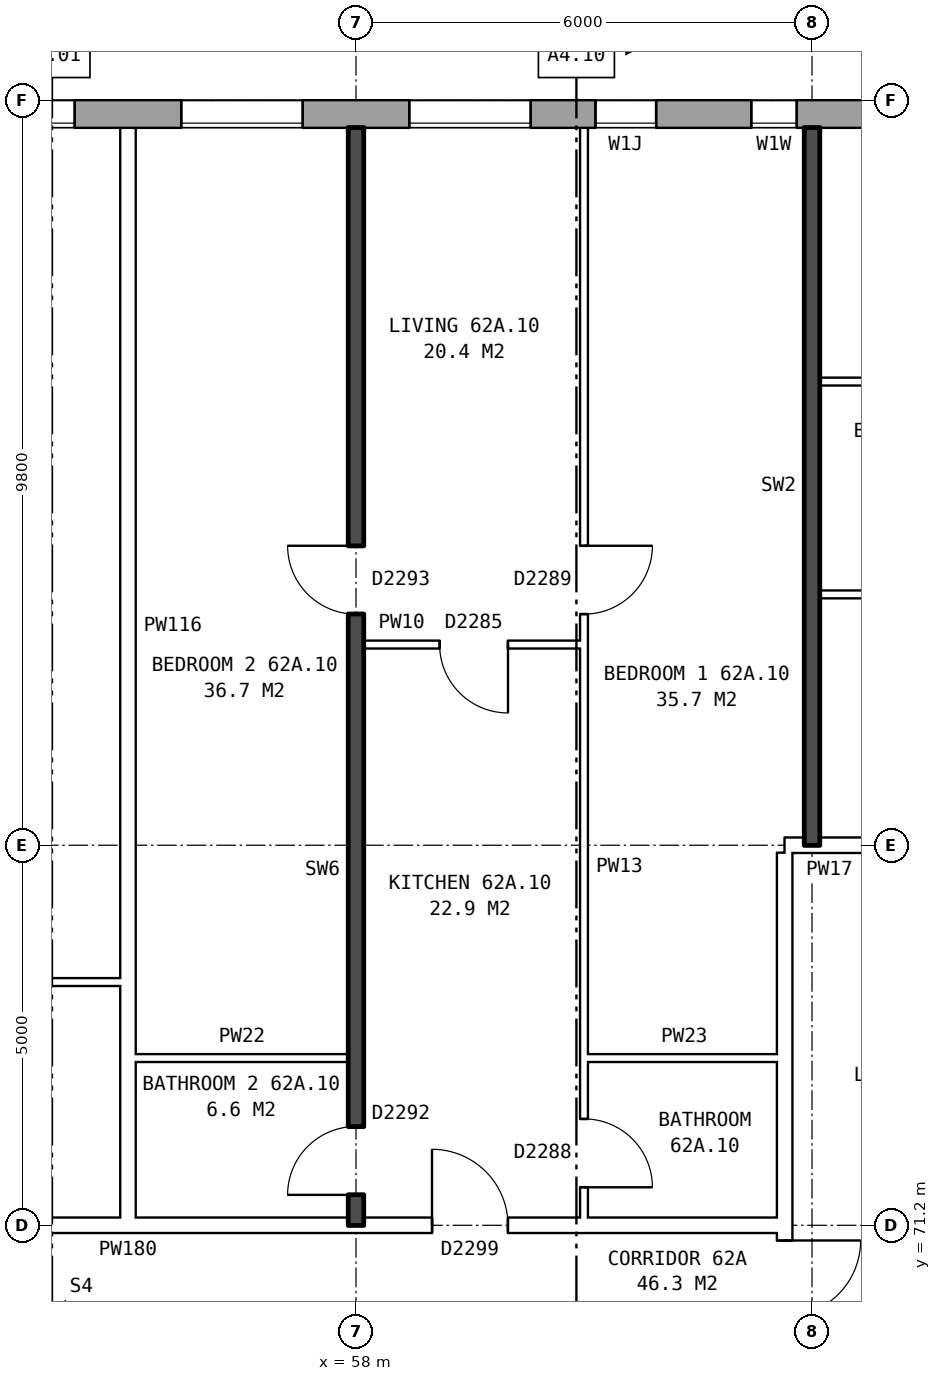
"""IFC4 building model, lengths in metres.
Left out: names, types, materials, properties, quantities, classifications, styles, units other than length and angle.
Written with IfcOpenShell. Run it as: python <this file> out.ifc"""

import sys

from ifc_helpers import new_model, si_unit, direction, frame, frame_2d, origin, place, context, subcontext, project, spatial, rectangle, extrude, element, fill, save


model = new_model("IFC4")
c1 = context("Model", 3, precision=1e-05, world=origin(), true_north=direction((0.0, 1.0)))
c2 = subcontext(c1, "Body", "Model", "MODEL_VIEW")
j1 = project(units=[si_unit("LENGTHUNIT", "METRE"), si_unit("PLANEANGLEUNIT", "RADIAN")], contexts=[c1])
p1 = place(None, origin())
s1 = spatial("IfcSite", under=j1, at=p1, CompositionType="ELEMENT")
p2 = place(p1, origin())
s2 = spatial("IfcBuilding", under=s1, at=p2, CompositionType="ELEMENT")
p3 = place(p2, frame((0.0, 0.0, 221.4)))
s3 = spatial("IfcBuildingStorey", under=s2, at=p3, CompositionType="ELEMENT", Elevation=221.4)
p4 = place(p3, frame((74.95, 85.82, 0.0), z_axis=(0.0, 0.0, 1.0), x_axis=(-1.0, 0.0, 0.0)))
e1 = element("IfcWall", 1, at=p4, inside=s3, PredefinedType="STANDARD", context=c2, shape_type="SweptSolid", body=[
    extrude(rectangle(XDim=39.875, YDim=0.36, at=frame_2d((19.938, 0.0))), origin(), (0.0, 0.0, 1.0), 2.85),
])
p5 = place(p4, frame((2.65, 0.0, 0.8)))
e2 = element("IfcOpeningElement", 2, at=p5, cuts=e1, PredefinedType="OPENING", context=c2, shape_type="SweptSolid", body=[
    extrude(rectangle(XDim=1.6, YDim=1.8, at=frame_2d((0.8, 0.9))), frame((0.0, 0.19, 0.0), z_axis=(0.0, -1.0, 0.0), x_axis=(1.0, 0.0, 0.0)), (0.0, 0.0, 1.0), 0.38),
])
p6 = place(p4, frame((5.65, 0.0, 0.8)))
e3 = element("IfcOpeningElement", 3, at=p6, cuts=e1, PredefinedType="OPENING", context=c2, shape_type="SweptSolid", body=[
    extrude(rectangle(XDim=1.6, YDim=1.8, at=frame_2d((0.8, 0.9))), frame((0.0, 0.19, 0.0), z_axis=(0.0, -1.0, 0.0), x_axis=(1.0, 0.0, 0.0)), (0.0, 0.0, 1.0), 0.38),
])
p7 = place(p4, frame((8.65, 0.0, 0.8)))
e4 = element("IfcOpeningElement", 4, at=p7, cuts=e1, PredefinedType="OPENING", context=c2, shape_type="SweptSolid", body=[
    extrude(rectangle(XDim=1.6, YDim=1.8, at=frame_2d((0.8, 0.9))), frame((0.0, 0.19, 0.0), z_axis=(0.0, -1.0, 0.0), x_axis=(1.0, 0.0, 0.0)), (0.0, 0.0, 1.0), 0.38),
])
p8 = place(p4, frame((11.15, 0.0, 1.55)))
e5 = element("IfcOpeningElement", 5, at=p8, cuts=e1, PredefinedType="OPENING", context=c2, shape_type="SweptSolid", body=[
    extrude(rectangle(XDim=0.6, YDim=0.9, at=frame_2d((0.3, 0.45))), frame((0.0, 0.19, 0.0), z_axis=(0.0, -1.0, 0.0), x_axis=(1.0, 0.0, 0.0)), (0.0, 0.0, 1.0), 0.38),
])
p9 = place(p4, frame((14.65, 0.0, 0.8)))
e6 = element("IfcOpeningElement", 6, at=p9, cuts=e1, PredefinedType="OPENING", context=c2, shape_type="SweptSolid", body=[
    extrude(rectangle(XDim=1.6, YDim=1.8, at=frame_2d((0.8, 0.9))), frame((0.0, 0.19, 0.0), z_axis=(0.0, -1.0, 0.0), x_axis=(1.0, 0.0, 0.0)), (0.0, 0.0, 1.0), 0.38),
])
p10 = place(p4, frame((17.65, 0.0, 0.8)))
e7 = element("IfcOpeningElement", 7, at=p10, cuts=e1, PredefinedType="OPENING", context=c2, shape_type="SweptSolid", body=[
    extrude(rectangle(XDim=1.6, YDim=1.8, at=frame_2d((0.8, 0.9))), frame((0.0, 0.19, 0.0), z_axis=(0.0, -1.0, 0.0), x_axis=(1.0, 0.0, 0.0)), (0.0, 0.0, 1.0), 0.38),
])
p11 = place(p4, frame((20.65, 0.0, 0.8)))
e8 = element("IfcOpeningElement", 8, at=p11, cuts=e1, PredefinedType="OPENING", context=c2, shape_type="SweptSolid", body=[
    extrude(rectangle(XDim=1.6, YDim=1.8, at=frame_2d((0.8, 0.9))), frame((0.0, 0.19, 0.0), z_axis=(0.0, -1.0, 0.0), x_axis=(1.0, 0.0, 0.0)), (0.0, 0.0, 1.0), 0.38),
])
p12 = place(p4, frame((23.65, 0.0, 0.8)))
e9 = element("IfcOpeningElement", 9, at=p12, cuts=e1, PredefinedType="OPENING", context=c2, shape_type="SweptSolid", body=[
    extrude(rectangle(XDim=1.6, YDim=1.8, at=frame_2d((0.8, 0.9))), frame((0.0, 0.19, 0.0), z_axis=(0.0, -1.0, 0.0), x_axis=(1.0, 0.0, 0.0)), (0.0, 0.0, 1.0), 0.38),
])
p13 = place(p4, frame((26.65, 0.0, 0.8)))
e10 = element("IfcOpeningElement", 10, at=p13, cuts=e1, PredefinedType="OPENING", context=c2, shape_type="SweptSolid", body=[
    extrude(rectangle(XDim=1.6, YDim=1.8, at=frame_2d((0.8, 0.9))), frame((0.0, 0.19, 0.0), z_axis=(0.0, -1.0, 0.0), x_axis=(1.0, 0.0, 0.0)), (0.0, 0.0, 1.0), 0.38),
])
p14 = place(p4, frame((30.05, 0.0, 1.7)))
e11 = element("IfcOpeningElement", 11, at=p14, cuts=e1, PredefinedType="OPENING", context=c2, shape_type="SweptSolid", body=[
    extrude(rectangle(XDim=0.6, YDim=0.9, at=frame_2d((0.3, 0.45))), frame((0.0, 0.19, 0.0), z_axis=(0.0, -1.0, 0.0), x_axis=(1.0, 0.0, 0.0)), (0.0, 0.0, 1.0), 0.38),
])
p15 = place(p4, frame((32.65, 0.0, 0.8)))
e12 = element("IfcOpeningElement", 12, at=p15, cuts=e1, PredefinedType="OPENING", context=c2, shape_type="SweptSolid", body=[
    extrude(rectangle(XDim=1.6, YDim=1.8, at=frame_2d((0.8, 0.9))), frame((0.0, 0.19, 0.0), z_axis=(0.0, -1.0, 0.0), x_axis=(1.0, 0.0, 0.0)), (0.0, 0.0, 1.0), 0.38),
])
p16 = place(p4, frame((35.65, 0.0, 0.8)))
e13 = element("IfcOpeningElement", 13, at=p16, cuts=e1, PredefinedType="OPENING", context=c2, shape_type="SweptSolid", body=[
    extrude(rectangle(XDim=1.6, YDim=1.8, at=frame_2d((0.8, 0.9))), frame((0.0, 0.19, 0.0), z_axis=(0.0, -1.0, 0.0), x_axis=(1.0, 0.0, 0.0)), (0.0, 0.0, 1.0), 0.38),
])
p17 = place(p4, frame((13.0, 0.0, 0.15)))
e14 = element("IfcOpeningElement", 14, at=p17, cuts=e1, PredefinedType="OPENING", context=c2, shape_type="SweptSolid", body=[
    extrude(rectangle(XDim=0.8, YDim=1.5, at=frame_2d((0.4, 0.75))), frame((0.0, 0.19, 0.0), z_axis=(0.0, -1.0, 0.0), x_axis=(1.0, 0.0, 0.0)), (0.0, 0.0, 1.0), 0.38),
])
p18 = place(p4, frame((30.95, 0.0, 0.8)))
e15 = element("IfcOpeningElement", 15, at=p18, cuts=e1, PredefinedType="OPENING", context=c2, shape_type="SweptSolid", body=[
    extrude(rectangle(XDim=1.4, YDim=1.8, at=frame_2d((0.7, 0.9))), frame((0.0, 0.19, 0.0), z_axis=(0.0, -1.0, 0.0), x_axis=(1.0, 0.0, 0.0)), (0.0, 0.0, 1.0), 0.38),
])
p19 = place(p3, frame((63.64, 63.9, 0.0), z_axis=(0.0, 0.0, 1.0), x_axis=(0.0, 1.0, 0.0)))
e16 = element("IfcWall", 16, at=p19, inside=s3, PredefinedType="PARTITIONING", context=c2, shape_type="SweptSolid", body=[
    extrude(rectangle(XDim=12.2, YDim=0.2, at=frame_2d((6.1, 0.0))), origin(), (0.0, 0.0, 1.0), 2.85),
])
p20 = place(p19, frame((5.1, 0.0, 0.0)))
e17 = element("IfcOpeningElement", 17, at=p20, cuts=e16, PredefinedType="OPENING", context=c2, shape_type="SweptSolid", body=[
    extrude(rectangle(XDim=2.0, YDim=2.1, at=frame_2d((1.0, 1.05))), frame((0.0, 0.11, 0.0), z_axis=(0.0, -1.0, 0.0), x_axis=(1.0, 0.0, 0.0)), (0.0, 0.0, 1.0), 0.22),
])
p21 = place(p3, frame((44.36, 71.2, 0.0), z_axis=(0.0, 0.0, 1.0), x_axis=(1.0, 0.0, 0.0)))
e18 = element("IfcWall", 18, at=p21, inside=s3, PredefinedType="PARTITIONING", context=c2, shape_type="SweptSolid", body=[
    extrude(rectangle(XDim=19.28, YDim=0.2, at=frame_2d((9.64, 0.0))), origin(), (0.0, 0.0, 1.0), 2.85),
])
p22 = place(p21, frame((14.64, 0.0, 0.0)))
e19 = element("IfcOpeningElement", 19, at=p22, cuts=e18, PredefinedType="OPENING", context=c2, shape_type="SweptSolid", body=[
    extrude(rectangle(XDim=1.0, YDim=2.1, at=frame_2d((0.5, 1.05))), frame((0.0, 0.11, 0.0), z_axis=(0.0, -1.0, 0.0), x_axis=(1.0, 0.0, 0.0)), (0.0, 0.0, 1.0), 0.22),
])
p23 = place(p21, frame((5.64, 0.0, 0.0)))
e20 = element("IfcOpeningElement", 20, at=p23, cuts=e18, PredefinedType="OPENING", context=c2, shape_type="SweptSolid", body=[
    extrude(rectangle(XDim=1.0, YDim=2.1, at=frame_2d((0.5, 1.05))), frame((0.0, 0.11, 0.0), z_axis=(0.0, -1.0, 0.0), x_axis=(1.0, 0.0, 0.0)), (0.0, 0.0, 1.0), 0.22),
])
p24 = place(p3, frame((55.1, 73.4, 0.0), z_axis=(0.0, 0.0, 1.0), x_axis=(1.0, 0.0, 0.0)))
e21 = element("IfcWall", 21, at=p24, inside=s3, PredefinedType="PARTITIONING", context=c2, shape_type="SweptSolid", body=[
    extrude(rectangle(XDim=2.8, YDim=0.1, at=frame_2d((1.4, 0.0))), origin(), (0.0, 0.0, 1.0), 2.85),
])
p25 = place(p3, frame((61.0, 73.4, 0.0), z_axis=(0.0, 0.0, 1.0), x_axis=(1.0, 0.0, 0.0)))
e22 = element("IfcWall", 22, at=p25, inside=s3, PredefinedType="PARTITIONING", context=c2, shape_type="SweptSolid", body=[
    extrude(rectangle(XDim=2.64, YDim=0.1, at=frame_2d((1.32, 0.0))), origin(), (0.0, 0.0, 1.0), 2.85),
])
p26 = place(p3, frame((52.1, 74.4, 0.0), z_axis=(0.0, 0.0, 1.0), x_axis=(1.0, 0.0, 0.0)))
e23 = element("IfcWall", 23, at=p26, inside=s3, PredefinedType="PARTITIONING", context=c2, shape_type="SweptSolid", body=[
    extrude(rectangle(XDim=2.8, YDim=0.1, at=frame_2d((1.4, 0.0))), origin(), (0.0, 0.0, 1.0), 2.85),
])
p27 = place(p3, frame((63.64, 76.2, 0.0), z_axis=(0.0, 0.0, 1.0), x_axis=(1.0, 0.0, 0.0)))
e24 = element("IfcWall", 24, at=p27, inside=s3, PredefinedType="PARTITIONING", context=c2, shape_type="SweptSolid", body=[
    extrude(rectangle(XDim=3.0, YDim=0.2, at=frame_2d((1.5, 0.0))), origin(), (0.0, 0.0, 1.0), 2.85),
])
p28 = place(p27, frame((1.18, 0.0, 0.0)))
e25 = element("IfcOpeningElement", 25, at=p28, cuts=e24, PredefinedType="OPENING", context=c2, shape_type="SweptSolid", body=[
    extrude(rectangle(XDim=1.0, YDim=2.1, at=frame_2d((0.5, 1.05))), frame((0.0, 0.11, 0.0), z_axis=(0.0, -1.0, 0.0), x_axis=(1.0, 0.0, 0.0)), (0.0, 0.0, 1.0), 0.22),
])
p29 = place(p3, frame((58.1, 78.84, 0.0), z_axis=(0.0, 0.0, 1.0), x_axis=(1.0, 0.0, 0.0)))
e26 = element("IfcWall", 26, at=p29, inside=s3, PredefinedType="PARTITIONING", context=c2, shape_type="SweptSolid", body=[
    extrude(rectangle(XDim=2.9, YDim=0.1, at=frame_2d((1.45, 0.0))), origin(), (0.0, 0.0, 1.0), 2.85),
])
p30 = place(p29, frame((1.0, 0.0, 0.0)))
e27 = element("IfcOpeningElement", 27, at=p30, cuts=e26, PredefinedType="OPENING", context=c2, shape_type="SweptSolid", body=[
    extrude(rectangle(XDim=0.9, YDim=2.1, at=frame_2d((0.45, 1.05))), frame((0.0, 0.06, 0.0), z_axis=(0.0, -1.0, 0.0), x_axis=(1.0, 0.0, 0.0)), (0.0, 0.0, 1.0), 0.12),
])
p31 = place(p3, frame((64.1, 79.5, 0.0), z_axis=(0.0, 0.0, 1.0), x_axis=(1.0, 0.0, 0.0)))
e28 = element("IfcWall", 28, at=p31, inside=s3, PredefinedType="PARTITIONING", context=c2, shape_type="SweptSolid", body=[
    extrude(rectangle(XDim=11.8, YDim=0.1, at=frame_2d((5.9, 0.0))), origin(), (0.0, 0.0, 1.0), 2.85),
])
p32 = place(p31, frame((3.65, 0.0, 0.0)))
e29 = element("IfcOpeningElement", 29, at=p32, cuts=e28, PredefinedType="OPENING", context=c2, shape_type="SweptSolid", body=[
    extrude(rectangle(XDim=0.9, YDim=2.1, at=frame_2d((0.45, 1.05))), frame((0.0, 0.06, 0.0), z_axis=(0.0, -1.0, 0.0), x_axis=(1.0, 0.0, 0.0)), (0.0, 0.0, 1.0), 0.12),
])
p33 = place(p31, frame((0.7, 0.0, 0.0)))
e30 = element("IfcOpeningElement", 30, at=p33, cuts=e28, PredefinedType="OPENING", context=c2, shape_type="SweptSolid", body=[
    extrude(rectangle(XDim=0.9, YDim=2.1, at=frame_2d((0.45, 1.05))), frame((0.0, 0.06, 0.0), z_axis=(0.0, -1.0, 0.0), x_axis=(1.0, 0.0, 0.0)), (0.0, 0.0, 1.0), 0.12),
])
p34 = place(p3, frame((64.1, 82.3, 0.0), z_axis=(0.0, 0.0, 1.0), x_axis=(1.0, 0.0, 0.0)))
e31 = element("IfcWall", 31, at=p34, inside=s3, PredefinedType="PARTITIONING", context=c2, shape_type="SweptSolid", body=[
    extrude(rectangle(XDim=2.3, YDim=0.1, at=frame_2d((1.15, 0.0))), origin(), (0.0, 0.0, 1.0), 2.85),
])
p35 = place(p3, frame((55.0, 71.3, 0.0), z_axis=(0.0, 0.0, 1.0), x_axis=(0.0, 1.0, 0.0)))
e32 = element("IfcWall", 32, at=p35, inside=s3, PredefinedType="PARTITIONING", context=c2, shape_type="SweptSolid", body=[
    extrude(rectangle(XDim=14.34, YDim=0.2, at=frame_2d((7.17, 0.0))), origin(), (0.0, 0.0, 1.0), 2.85),
])
p36 = place(p3, frame((58.0, 71.2, 0.0), z_axis=(0.0, 0.0, 1.0), x_axis=(0.0, 1.0, 0.0)))
e33 = element("IfcWall", 33, at=p36, inside=s3, PredefinedType="SOLIDWALL", context=c2, shape_type="SweptSolid", body=[
    extrude(rectangle(XDim=14.44, YDim=0.2, at=frame_2d((7.22, 0.0))), origin(), (0.0, 0.0, 1.0), 2.85),
])
p37 = place(p36, frame((8.04, 0.0, 0.0)))
e34 = element("IfcOpeningElement", 34, at=p37, cuts=e33, PredefinedType="OPENING", context=c2, shape_type="SweptSolid", body=[
    extrude(rectangle(XDim=0.9, YDim=2.1, at=frame_2d((0.45, 1.05))), frame((0.0, 0.11, 0.0), z_axis=(0.0, -1.0, 0.0), x_axis=(1.0, 0.0, 0.0)), (0.0, 0.0, 1.0), 0.22),
])
p38 = place(p36, frame((0.4, 0.0, 0.0)))
e35 = element("IfcOpeningElement", 35, at=p38, cuts=e33, PredefinedType="OPENING", context=c2, shape_type="SweptSolid", body=[
    extrude(rectangle(XDim=0.9, YDim=2.1, at=frame_2d((0.45, 1.05))), frame((0.0, 0.11, 0.0), z_axis=(0.0, -1.0, 0.0), x_axis=(1.0, 0.0, 0.0)), (0.0, 0.0, 1.0), 0.22),
])
p39 = place(p3, frame((61.0, 71.3, 0.0), z_axis=(0.0, 0.0, 1.0), x_axis=(0.0, 1.0, 0.0)))
e36 = element("IfcWall", 36, at=p39, inside=s3, PredefinedType="PARTITIONING", context=c2, shape_type="SweptSolid", body=[
    extrude(rectangle(XDim=14.34, YDim=0.1, at=frame_2d((7.17, 0.0))), origin(), (0.0, 0.0, 1.0), 2.85),
])
p40 = place(p39, frame((7.94, 0.0, 0.0)))
e37 = element("IfcOpeningElement", 37, at=p40, cuts=e36, PredefinedType="OPENING", context=c2, shape_type="SweptSolid", body=[
    extrude(rectangle(XDim=0.9, YDim=2.1, at=frame_2d((0.45, 1.05))), frame((0.0, 0.06, 0.0), z_axis=(0.0, -1.0, 0.0), x_axis=(1.0, 0.0, 0.0)), (0.0, 0.0, 1.0), 0.12),
])
p41 = place(p39, frame((0.4, 0.0, 0.0)))
e38 = element("IfcOpeningElement", 38, at=p41, cuts=e36, PredefinedType="OPENING", context=c2, shape_type="SweptSolid", body=[
    extrude(rectangle(XDim=0.9, YDim=2.1, at=frame_2d((0.45, 1.05))), frame((0.0, 0.06, 0.0), z_axis=(0.0, -1.0, 0.0), x_axis=(1.0, 0.0, 0.0)), (0.0, 0.0, 1.0), 0.12),
])
p42 = place(p3, frame((64.0, 76.2, 0.0), z_axis=(0.0, 0.0, 1.0), x_axis=(0.0, 1.0, 0.0)))
e39 = element("IfcWall", 39, at=p42, inside=s3, PredefinedType="SOLIDWALL", context=c2, shape_type="SweptSolid", body=[
    extrude(rectangle(XDim=9.44, YDim=0.2, at=frame_2d((4.72, 0.0))), origin(), (0.0, 0.0, 1.0), 2.85),
])
p43 = place(p8, origin())
e40 = element("IfcWindow", 40, at=p43, inside=s3, PartitioningType="SINGLE_PANEL", PredefinedType="WINDOW", context=c2, shape_type="SweptSolid", body=[
    extrude(rectangle(XDim=0.6, YDim=0.9, at=frame_2d((0.3, 0.45))), frame((0.0, 0.15, 0.0), z_axis=(0.0, -1.0, 0.0), x_axis=(1.0, 0.0, 0.0)), (0.0, 0.0, 1.0), 0.06),
])
fill(e5, e40)
p44 = place(p9, origin())
e41 = element("IfcWindow", 41, at=p44, inside=s3, PartitioningType="SINGLE_PANEL", PredefinedType="WINDOW", context=c2, shape_type="SweptSolid", body=[
    extrude(rectangle(XDim=1.6, YDim=1.8, at=frame_2d((0.8, 0.9))), frame((0.0, 0.15, 0.0), z_axis=(0.0, -1.0, 0.0), x_axis=(1.0, 0.0, 0.0)), (0.0, 0.0, 1.0), 0.06),
])
fill(e6, e41)
p45 = place(p10, origin())
e42 = element("IfcWindow", 42, at=p45, inside=s3, PartitioningType="SINGLE_PANEL", PredefinedType="WINDOW", context=c2, shape_type="SweptSolid", body=[
    extrude(rectangle(XDim=1.6, YDim=1.8, at=frame_2d((0.8, 0.9))), frame((0.0, 0.15, 0.0), z_axis=(0.0, -1.0, 0.0), x_axis=(1.0, 0.0, 0.0)), (0.0, 0.0, 1.0), 0.06),
])
fill(e7, e42)
p46 = place(p11, origin())
e43 = element("IfcWindow", 43, at=p46, inside=s3, PartitioningType="SINGLE_PANEL", PredefinedType="WINDOW", context=c2, shape_type="SweptSolid", body=[
    extrude(rectangle(XDim=1.6, YDim=1.8, at=frame_2d((0.8, 0.9))), frame((0.0, 0.15, 0.0), z_axis=(0.0, -1.0, 0.0), x_axis=(1.0, 0.0, 0.0)), (0.0, 0.0, 1.0), 0.06),
])
fill(e8, e43)
p47 = place(p20, frame((2.0, 0.0, 0.0), z_axis=(0.0, 0.0, 1.0), x_axis=(-1.0, 0.0, 0.0)))
e44 = element("IfcDoor", 44, at=p47, inside=s3, OperationType="DOUBLE_DOOR_SINGLE_SWING", PredefinedType="DOOR", context=c2, shape_type="SweptSolid", body=[
    extrude(rectangle(XDim=2.0, YDim=2.1, at=frame_2d((1.0, 1.05))), frame((0.0, 0.025, 0.0), z_axis=(0.0, -1.0, 0.0), x_axis=(1.0, 0.0, 0.0)), (0.0, 0.0, 1.0), 0.05),
])
fill(e17, e44)
p48 = place(p40, frame((0.9, 0.0, 0.0), z_axis=(0.0, 0.0, 1.0), x_axis=(-1.0, 0.0, 0.0)))
e45 = element("IfcDoor", 45, at=p48, inside=s3, OperationType="SINGLE_SWING_LEFT", PredefinedType="DOOR", context=c2, shape_type="SweptSolid", body=[
    extrude(rectangle(XDim=0.9, YDim=2.1, at=frame_2d((0.45, 1.05))), frame((0.0, 0.025, 0.0), z_axis=(0.0, -1.0, 0.0), x_axis=(1.0, 0.0, 0.0)), (0.0, 0.0, 1.0), 0.05),
])
fill(e37, e45)
p49 = place(p37, origin())
e46 = element("IfcDoor", 46, at=p49, inside=s3, OperationType="SINGLE_SWING_RIGHT", PredefinedType="DOOR", context=c2, shape_type="SweptSolid", body=[
    extrude(rectangle(XDim=0.9, YDim=2.1, at=frame_2d((0.45, 1.05))), frame((0.0, 0.025, 0.0), z_axis=(0.0, -1.0, 0.0), x_axis=(1.0, 0.0, 0.0)), (0.0, 0.0, 1.0), 0.05),
])
fill(e34, e46)
p50 = place(p22, origin())
e47 = element("IfcDoor", 47, at=p50, inside=s3, OperationType="SINGLE_SWING_LEFT", PredefinedType="DOOR", context=c2, shape_type="SweptSolid", body=[
    extrude(rectangle(XDim=1.0, YDim=2.1, at=frame_2d((0.5, 1.05))), frame((0.0, 0.025, 0.0), z_axis=(0.0, -1.0, 0.0), x_axis=(1.0, 0.0, 0.0)), (0.0, 0.0, 1.0), 0.05),
])
fill(e19, e47)
p51 = place(p30, frame((0.9, 0.0, 0.0), z_axis=(0.0, 0.0, 1.0), x_axis=(-1.0, 0.0, 0.0)))
e48 = element("IfcDoor", 48, at=p51, inside=s3, OperationType="SINGLE_SWING_LEFT", PredefinedType="DOOR", context=c2, shape_type="SweptSolid", body=[
    extrude(rectangle(XDim=0.9, YDim=2.1, at=frame_2d((0.45, 1.05))), frame((0.0, 0.025, 0.0), z_axis=(0.0, -1.0, 0.0), x_axis=(1.0, 0.0, 0.0)), (0.0, 0.0, 1.0), 0.05),
])
fill(e27, e48)
p52 = place(p41, frame((0.9, 0.0, 0.0), z_axis=(0.0, 0.0, 1.0), x_axis=(-1.0, 0.0, 0.0)))
e49 = element("IfcDoor", 49, at=p52, inside=s3, OperationType="SINGLE_SWING_RIGHT", PredefinedType="DOOR", context=c2, shape_type="SweptSolid", body=[
    extrude(rectangle(XDim=0.9, YDim=2.1, at=frame_2d((0.45, 1.05))), frame((0.0, 0.025, 0.0), z_axis=(0.0, -1.0, 0.0), x_axis=(1.0, 0.0, 0.0)), (0.0, 0.0, 1.0), 0.05),
])
fill(e38, e49)
p53 = place(p38, origin())
e50 = element("IfcDoor", 50, at=p53, inside=s3, OperationType="SINGLE_SWING_LEFT", PredefinedType="DOOR", context=c2, shape_type="SweptSolid", body=[
    extrude(rectangle(XDim=0.9, YDim=2.1, at=frame_2d((0.45, 1.05))), frame((0.0, 0.025, 0.0), z_axis=(0.0, -1.0, 0.0), x_axis=(1.0, 0.0, 0.0)), (0.0, 0.0, 1.0), 0.05),
])
fill(e35, e50)
p54 = place(p17, origin())
e51 = element("IfcWindow", 51, at=p54, inside=s3, PartitioningType="SINGLE_PANEL", PredefinedType="WINDOW", context=c2, shape_type="SweptSolid", body=[
    extrude(rectangle(XDim=0.8, YDim=1.5, at=frame_2d((0.4, 0.75))), frame((0.0, 0.15, 0.0), z_axis=(0.0, -1.0, 0.0), x_axis=(1.0, 0.0, 0.0)), (0.0, 0.0, 1.0), 0.06),
])
fill(e14, e51)
save(model, sys.argv[1])
